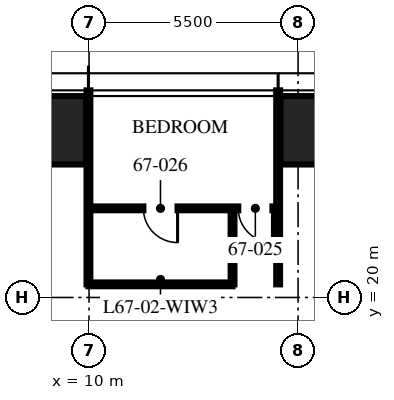
"""IFC4 building model, lengths in metres.
Left out: names, types, materials, properties, quantities, classifications, styles, units other than length and angle.
Written with IfcOpenShell. Run it as: python <this file> out.ifc"""

import sys

from ifc_helpers import new_model, si_unit, direction, frame, frame_2d, origin, origin_2d, place, context, subcontext, project, spatial, rectangle, hollow_rectangle, extrude, element, fill, save


model = new_model("IFC4")
c1 = context("Model", 3, precision=1e-05, world=origin(), true_north=direction((0.0, 1.0)))
c2 = subcontext(c1, "Body", "Model", "MODEL_VIEW")
j1 = project(units=[si_unit("LENGTHUNIT", "METRE"), si_unit("PLANEANGLEUNIT", "RADIAN")], contexts=[c1])
p1 = place(None, origin())
s1 = spatial("IfcSite", under=j1, at=p1, CompositionType="ELEMENT")
p2 = place(p1, origin())
s2 = spatial("IfcBuilding", under=s1, at=p2, CompositionType="ELEMENT")
p3 = place(p2, frame((0.0, 0.0, 267.0)))
s3 = spatial("IfcBuildingStorey", under=s2, at=p3, CompositionType="ELEMENT", Elevation=267.0)
for number, where, z_axis, x_axis in (
    (1, (8.32, 24.4, 0.0), (0.0, 0.0, 1.0), (1.0, 0.0, 0.0)),
    (2, (16.64, 24.4, 0.0), (0.0, 0.0, 1.0), (1.0, 0.0, 0.0)),
):
    element("IfcColumn", number, at=place(p3, frame(where, z_axis=z_axis, x_axis=x_axis)), inside=s3, PredefinedType="COLUMN", context=c2, shape_type="SweptSolid", body=[
        extrude(hollow_rectangle(XDim=3.2, YDim=1.8, WallThickness=0.14, at=origin_2d()), origin(), (0.0, 0.0, 1.0), 3.75),
    ])
for number, where, z_axis, x_axis in (
    (3, (14.976, 20.345, 0.0), (0.0, 0.0, 1.0), (0.0, 1.0, 0.0)),
    (4, (9.984, 20.345, 0.0), (0.0, 0.0, 1.0), (0.0, 1.0, 0.0)),
):
    element("IfcWall", number, at=place(p3, frame(where, z_axis=z_axis, x_axis=x_axis)), inside=s3, PredefinedType="PARTITIONING", context=c2, shape_type="SweptSolid", body=[
        extrude(rectangle(XDim=5.105, YDim=0.1, at=frame_2d((2.552, 0.0))), origin(), (0.0, 0.0, 1.0), 2.91),
    ])
p4 = place(p3, frame((14.976, 22.345, 0.0), z_axis=(0.0, 0.0, 1.0), x_axis=(-1.0, 0.0, 0.0)))
e5 = element("IfcWall", 5, at=p4, inside=s3, PredefinedType="PARTITIONING", context=c2, shape_type="SweptSolid", body=[
    extrude(rectangle(XDim=4.992, YDim=0.1, at=frame_2d((2.496, 0.0))), origin(), (0.0, 0.0, 1.0), 2.81),
])
p5 = place(p4, frame((0.15, 0.0, 0.0)))
e6 = element("IfcOpeningElement", 6, at=p5, cuts=e5, PredefinedType="OPENING", context=c2, shape_type="SweptSolid", body=[
    extrude(rectangle(XDim=0.9, YDim=2.1, at=frame_2d((0.45, 1.05))), frame((0.0, 0.06, 0.0), z_axis=(0.0, -1.0, 0.0), x_axis=(1.0, 0.0, 0.0)), (0.0, 0.0, 1.0), 0.12),
])
p6 = place(p4, frame((2.646, 0.0, 0.0)))
e7 = element("IfcOpeningElement", 7, at=p6, cuts=e5, PredefinedType="OPENING", context=c2, shape_type="SweptSolid", body=[
    extrude(rectangle(XDim=0.9, YDim=2.1, at=frame_2d((0.45, 1.05))), frame((0.0, 0.06, 0.0), z_axis=(0.0, -1.0, 0.0), x_axis=(1.0, 0.0, 0.0)), (0.0, 0.0, 1.0), 0.12),
])
p7 = place(p3, frame((13.776, 20.345, 0.0), z_axis=(0.0, 0.0, 1.0), x_axis=(0.0, 1.0, 0.0)))
e8 = element("IfcWall", 8, at=p7, inside=s3, PredefinedType="PARTITIONING", context=c2, shape_type="SweptSolid", body=[
    extrude(rectangle(XDim=2.0, YDim=0.1, at=frame_2d((1.0, 0.0))), origin(), (0.0, 0.0, 1.0), 3.5),
])
p8 = place(p3, frame((13.776, 20.345, 0.0), z_axis=(0.0, 0.0, 1.0), x_axis=(-1.0, 0.0, 0.0)))
e9 = element("IfcWall", 9, at=p8, inside=s3, PredefinedType="PARTITIONING", context=c2, shape_type="SweptSolid", body=[
    extrude(rectangle(XDim=3.792, YDim=0.1, at=frame_2d((1.896, 0.0))), origin(), (0.0, 0.0, 1.0), 2.81),
])
p9 = place(p5, origin())
e10 = element("IfcDoor", 10, at=p9, inside=s3, OperationType="SINGLE_SWING_LEFT", PredefinedType="DOOR", context=c2, shape_type="SweptSolid", body=[
    extrude(rectangle(XDim=0.9, YDim=2.1, at=frame_2d((0.45, 1.05))), frame((0.0, 0.025, 0.0), z_axis=(0.0, -1.0, 0.0), x_axis=(1.0, 0.0, 0.0)), (0.0, 0.0, 1.0), 0.05),
])
fill(e6, e10)
p10 = place(p6, origin())
e11 = element("IfcDoor", 11, at=p10, inside=s3, OperationType="SINGLE_SWING_LEFT", PredefinedType="DOOR", context=c2, shape_type="SweptSolid", body=[
    extrude(rectangle(XDim=0.9, YDim=2.1, at=frame_2d((0.45, 1.05))), frame((0.0, 0.025, 0.0), z_axis=(0.0, -1.0, 0.0), x_axis=(1.0, 0.0, 0.0)), (0.0, 0.0, 1.0), 0.05),
])
fill(e7, e11)
save(model, sys.argv[1])
